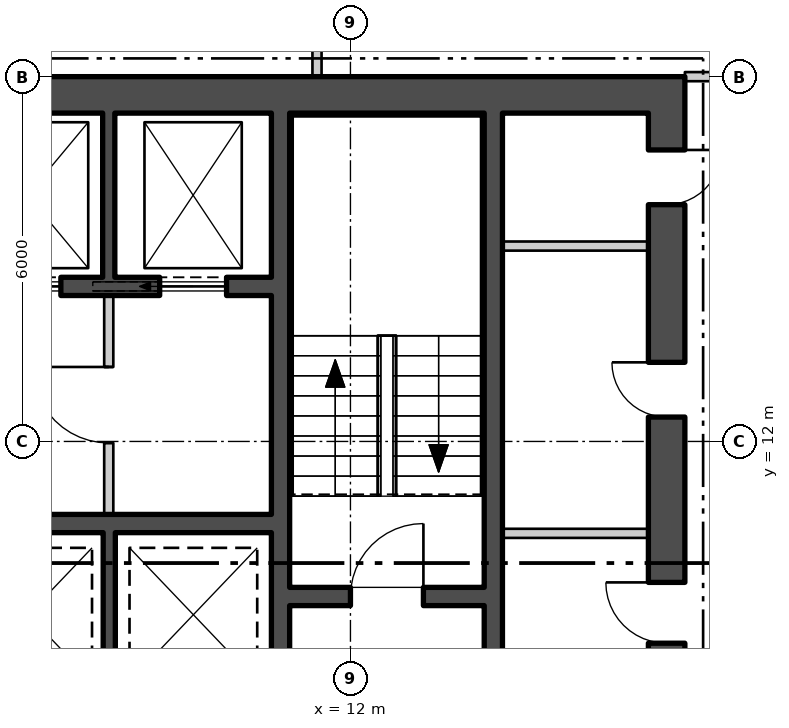
"""IFC4 building model, lengths in metres.
Left out: names, types, materials, properties, quantities, classifications, styles, units other than length and angle.
Written with IfcOpenShell. Run it as: python <this file> out.ifc"""

import sys

from ifc_helpers import new_model, si_unit, direction, frame, frame_2d, origin, place, context, subcontext, project, spatial, rectangle, extrude, element, fill, save


model = new_model("IFC4")
c1 = context("Model", 3, precision=1e-05, world=origin(), true_north=direction((0.0, 1.0)))
c2 = subcontext(c1, "Body", "Model", "MODEL_VIEW")
j1 = project(units=[si_unit("LENGTHUNIT", "METRE"), si_unit("PLANEANGLEUNIT", "RADIAN")], contexts=[c1])
p1 = place(None, origin())
s1 = spatial("IfcSite", under=j1, at=p1, CompositionType="ELEMENT")
p2 = place(p1, origin())
s2 = spatial("IfcBuilding", under=s1, at=p2, CompositionType="ELEMENT")
p3 = place(p2, frame((0.0, 0.0, 18.6)))
s3 = spatial("IfcBuildingStorey", under=s2, at=p3, CompositionType="ELEMENT", Elevation=18.6)
p4 = place(p3, frame((-17.5, 17.7, 0.0), z_axis=(0.0, 0.0, 1.0), x_axis=(1.0, 0.0, 0.0)))
e1 = element("IfcWall", 1, at=p4, inside=s3, PredefinedType="SHEAR", context=c2, shape_type="SweptSolid", body=[
    extrude(rectangle(XDim=35.0, YDim=0.6, at=frame_2d((17.5, 0.0))), origin(), (0.0, 0.0, 1.0), 4.88),
])
p5 = place(p3, frame((17.2, 0.6, 0.0), z_axis=(0.0, 0.0, 1.0), x_axis=(0.0, 1.0, 0.0)))
e2 = element("IfcWall", 2, at=p5, inside=s3, PredefinedType="SHEAR", context=c2, shape_type="SweptSolid", body=[
    extrude(rectangle(XDim=16.8, YDim=0.6, at=frame_2d((8.4, 0.0))), origin(), (0.0, 0.0, 1.0), 4.88),
])
p6 = place(p5, frame((5.7, 0.0, 0.0)))
e3 = element("IfcOpeningElement", 3, at=p6, cuts=e2, PredefinedType="OPENING", context=c2, shape_type="SweptSolid", body=[
    extrude(rectangle(XDim=1.5, YDim=2.1, at=frame_2d((0.75, 1.05))), frame((0.0, 0.31, 0.0), z_axis=(0.0, -1.0, 0.0), x_axis=(1.0, 0.0, 0.0)), (0.0, 0.0, 1.0), 0.62),
])
p7 = place(p5, frame((0.4, 0.0, 0.0)))
e4 = element("IfcOpeningElement", 4, at=p7, cuts=e2, PredefinedType="OPENING", context=c2, shape_type="SweptSolid", body=[
    extrude(rectangle(XDim=0.9, YDim=2.1, at=frame_2d((0.45, 1.05))), frame((0.0, 0.31, 0.0), z_axis=(0.0, -1.0, 0.0), x_axis=(1.0, 0.0, 0.0)), (0.0, 0.0, 1.0), 0.62),
])
p8 = place(p5, frame((3.15, 0.0, 0.0)))
e5 = element("IfcOpeningElement", 5, at=p8, cuts=e2, PredefinedType="OPENING", context=c2, shape_type="SweptSolid", body=[
    extrude(rectangle(XDim=0.9, YDim=2.1, at=frame_2d((0.45, 1.05))), frame((0.0, 0.31, 0.0), z_axis=(0.0, -1.0, 0.0), x_axis=(1.0, 0.0, 0.0)), (0.0, 0.0, 1.0), 0.62),
])
p9 = place(p5, frame((8.082, 0.0, 0.0)))
e6 = element("IfcOpeningElement", 6, at=p9, cuts=e2, PredefinedType="OPENING", context=c2, shape_type="SweptSolid", body=[
    extrude(rectangle(XDim=1.0, YDim=2.1, at=frame_2d((0.5, 1.05))), frame((0.0, 0.31, 0.0), z_axis=(0.0, -1.0, 0.0), x_axis=(1.0, 0.0, 0.0)), (0.0, 0.0, 1.0), 0.62),
])
p10 = place(p5, frame((11.801, 0.0, 0.0)))
e7 = element("IfcOpeningElement", 7, at=p10, cuts=e2, PredefinedType="OPENING", context=c2, shape_type="SweptSolid", body=[
    extrude(rectangle(XDim=0.9, YDim=2.1, at=frame_2d((0.45, 1.05))), frame((0.0, 0.31, 0.0), z_axis=(0.0, -1.0, 0.0), x_axis=(1.0, 0.0, 0.0)), (0.0, 0.0, 1.0), 0.62),
])
p11 = place(p5, frame((15.294, 0.0, 0.0)))
e8 = element("IfcOpeningElement", 8, at=p11, cuts=e2, PredefinedType="OPENING", context=c2, shape_type="SweptSolid", body=[
    extrude(rectangle(XDim=0.9, YDim=2.1, at=frame_2d((0.45, 1.05))), frame((0.0, 0.31, 0.0), z_axis=(0.0, -1.0, 0.0), x_axis=(1.0, 0.0, 0.0)), (0.0, 0.0, 1.0), 0.62),
])
p12 = place(p3, frame((10.85, 0.6, 0.0), z_axis=(0.0, 0.0, 1.0), x_axis=(0.0, 1.0, 0.0)))
e9 = element("IfcWall", 9, at=p12, inside=s3, PredefinedType="SHEAR", context=c2, shape_type="SweptSolid", body=[
    extrude(rectangle(XDim=16.8, YDim=0.3, at=frame_2d((8.4, 0.0))), origin(), (0.0, 0.0, 1.0), 4.88),
])
p13 = place(p12, frame((5.075, 0.0, 0.0)))
e10 = element("IfcOpeningElement", 10, at=p13, cuts=e9, PredefinedType="OPENING", context=c2, shape_type="SweptSolid", body=[
    extrude(rectangle(XDim=1.25, YDim=2.1, at=frame_2d((0.625, 1.05))), frame((0.0, 0.16, 0.0), z_axis=(0.0, -1.0, 0.0), x_axis=(1.0, 0.0, 0.0)), (0.0, 0.0, 1.0), 0.32),
])
p14 = place(p12, frame((1.525, 0.0, 0.0)))
e11 = element("IfcOpeningElement", 11, at=p14, cuts=e9, PredefinedType="OPENING", context=c2, shape_type="SweptSolid", body=[
    extrude(rectangle(XDim=1.0, YDim=2.1, at=frame_2d((0.5, 1.05))), frame((0.0, 0.16, 0.0), z_axis=(0.0, -1.0, 0.0), x_axis=(1.0, 0.0, 0.0)), (0.0, 0.0, 1.0), 0.32),
])
p15 = place(p3, frame((14.35, 0.6, 0.0), z_axis=(0.0, 0.0, 1.0), x_axis=(0.0, 1.0, 0.0)))
e12 = element("IfcWall", 12, at=p15, inside=s3, PredefinedType="SHEAR", context=c2, shape_type="SweptSolid", body=[
    extrude(rectangle(XDim=16.8, YDim=0.3, at=frame_2d((8.4, 0.0))), origin(), (0.0, 0.0, 1.0), 4.88),
])
p16 = place(p15, frame((5.7, 0.0, 0.0)))
e13 = element("IfcOpeningElement", 13, at=p16, cuts=e12, PredefinedType="OPENING", context=c2, shape_type="SweptSolid", body=[
    extrude(rectangle(XDim=1.5, YDim=2.1, at=frame_2d((0.75, 1.05))), frame((0.0, 0.16, 0.0), z_axis=(0.0, -1.0, 0.0), x_axis=(1.0, 0.0, 0.0)), (0.0, 0.0, 1.0), 0.32),
])
p17 = place(p3, frame((11.0, 9.45, 0.0), z_axis=(0.0, 0.0, 1.0), x_axis=(1.0, 0.0, 0.0)))
e14 = element("IfcWall", 14, at=p17, inside=s3, PredefinedType="SHEAR", context=c2, shape_type="SweptSolid", body=[
    extrude(rectangle(XDim=3.2, YDim=0.3, at=frame_2d((1.6, 0.0))), origin(), (0.0, 0.0, 1.0), 4.88),
])
p18 = place(p17, frame((1.0, 0.0, 0.0)))
e15 = element("IfcOpeningElement", 15, at=p18, cuts=e14, PredefinedType="OPENING", context=c2, shape_type="SweptSolid", body=[
    extrude(rectangle(XDim=1.2, YDim=2.1, at=frame_2d((0.6, 1.05))), frame((0.0, 0.16, 0.0), z_axis=(0.0, -1.0, 0.0), x_axis=(1.0, 0.0, 0.0)), (0.0, 0.0, 1.0), 0.32),
])
p19 = place(p3, frame((-10.7, 14.55, 0.0), z_axis=(0.0, 0.0, 1.0), x_axis=(1.0, 0.0, 0.0)))
e16 = element("IfcWall", 16, at=p19, inside=s3, PredefinedType="SHEAR", context=c2, shape_type="SweptSolid", body=[
    extrude(rectangle(XDim=21.4, YDim=0.3, at=frame_2d((10.7, 0.0))), origin(), (0.0, 0.0, 1.0), 4.88),
])
p20 = place(p19, frame((0.738, 0.0, 0.0)))
e17 = element("IfcOpeningElement", 17, at=p20, cuts=e16, PredefinedType="OPENING", context=c2, shape_type="SweptSolid", body=[
    extrude(rectangle(XDim=1.1, YDim=2.1, at=frame_2d((0.55, 1.05))), frame((0.0, 0.16, 0.0), z_axis=(0.0, -1.0, 0.0), x_axis=(1.0, 0.0, 0.0)), (0.0, 0.0, 1.0), 0.32),
])
p21 = place(p19, frame((3.462, 0.0, 0.0)))
e18 = element("IfcOpeningElement", 18, at=p21, cuts=e16, PredefinedType="OPENING", context=c2, shape_type="SweptSolid", body=[
    extrude(rectangle(XDim=1.1, YDim=2.1, at=frame_2d((0.55, 1.05))), frame((0.0, 0.16, 0.0), z_axis=(0.0, -1.0, 0.0), x_axis=(1.0, 0.0, 0.0)), (0.0, 0.0, 1.0), 0.32),
])
p22 = place(p19, frame((6.138, 0.0, 0.0)))
e19 = element("IfcOpeningElement", 19, at=p22, cuts=e16, PredefinedType="OPENING", context=c2, shape_type="SweptSolid", body=[
    extrude(rectangle(XDim=1.1, YDim=2.1, at=frame_2d((0.55, 1.05))), frame((0.0, 0.16, 0.0), z_axis=(0.0, -1.0, 0.0), x_axis=(1.0, 0.0, 0.0)), (0.0, 0.0, 1.0), 0.32),
])
p23 = place(p19, frame((8.812, 0.0, 0.0)))
e20 = element("IfcOpeningElement", 20, at=p23, cuts=e16, PredefinedType="OPENING", context=c2, shape_type="SweptSolid", body=[
    extrude(rectangle(XDim=1.1, YDim=2.1, at=frame_2d((0.55, 1.05))), frame((0.0, 0.16, 0.0), z_axis=(0.0, -1.0, 0.0), x_axis=(1.0, 0.0, 0.0)), (0.0, 0.0, 1.0), 0.32),
])
p24 = place(p19, frame((14.162, 0.0, 0.0)))
e21 = element("IfcOpeningElement", 21, at=p24, cuts=e16, PredefinedType="OPENING", context=c2, shape_type="SweptSolid", body=[
    extrude(rectangle(XDim=1.1, YDim=2.1, at=frame_2d((0.55, 1.05))), frame((0.0, 0.16, 0.0), z_axis=(0.0, -1.0, 0.0), x_axis=(1.0, 0.0, 0.0)), (0.0, 0.0, 1.0), 0.32),
])
p25 = place(p19, frame((16.837, 0.0, 0.0)))
e22 = element("IfcOpeningElement", 22, at=p25, cuts=e16, PredefinedType="OPENING", context=c2, shape_type="SweptSolid", body=[
    extrude(rectangle(XDim=1.1, YDim=2.1, at=frame_2d((0.55, 1.05))), frame((0.0, 0.16, 0.0), z_axis=(0.0, -1.0, 0.0), x_axis=(1.0, 0.0, 0.0)), (0.0, 0.0, 1.0), 0.32),
])
p26 = place(p19, frame((19.562, 0.0, 0.0)))
e23 = element("IfcOpeningElement", 23, at=p26, cuts=e16, PredefinedType="OPENING", context=c2, shape_type="SweptSolid", body=[
    extrude(rectangle(XDim=1.1, YDim=2.1, at=frame_2d((0.55, 1.05))), frame((0.0, 0.16, 0.0), z_axis=(0.0, -1.0, 0.0), x_axis=(1.0, 0.0, 0.0)), (0.0, 0.0, 1.0), 0.32),
])
p27 = place(p3, frame((2.6, 10.65, 0.0), z_axis=(0.0, 0.0, 1.0), x_axis=(1.0, 0.0, 0.0)))
e24 = element("IfcWall", 24, at=p27, inside=s3, PredefinedType="SHEAR", context=c2, shape_type="SweptSolid", body=[
    extrude(rectangle(XDim=8.1, YDim=0.3, at=frame_2d((4.05, 0.0))), origin(), (0.0, 0.0, 1.0), 4.88),
])
for number, where, z_axis, x_axis in (
    (25, (8.025, 14.7, 0.0), (0.0, 0.0, 1.0), (0.0, 1.0, 0.0)),
    (26, (8.033, 7.8, 0.0), (0.0, 0.0, 1.0), (0.0, 1.0, 0.0)),
):
    element("IfcWall", number, at=place(p3, frame(where, z_axis=z_axis, x_axis=x_axis)), inside=s3, PredefinedType="SHEAR", context=c2, shape_type="SweptSolid", body=[
        extrude(rectangle(XDim=2.7, YDim=0.2, at=frame_2d((1.35, 0.0))), origin(), (0.0, 0.0, 1.0), 4.88),
    ])
p28 = place(p3, frame((8.025, 10.8, 0.0), z_axis=(0.0, 0.0, 1.0), x_axis=(0.0, 1.0, 0.0)))
e27 = element("IfcWall", 27, at=p28, inside=s3, PredefinedType="PARTITIONING", context=c2, shape_type="SweptSolid", body=[
    extrude(rectangle(XDim=3.6, YDim=0.15, at=frame_2d((1.8, 0.0))), origin(), (0.0, 0.0, 1.0), 4.88),
])
p29 = place(p28, frame((1.175, 0.0, 0.0)))
e28 = element("IfcOpeningElement", 28, at=p29, cuts=e27, PredefinedType="OPENING", context=c2, shape_type="SweptSolid", body=[
    extrude(rectangle(XDim=1.25, YDim=2.1, at=frame_2d((0.625, 1.05))), frame((0.0, 0.085, 0.0), z_axis=(0.0, -1.0, 0.0), x_axis=(1.0, 0.0, 0.0)), (0.0, 0.0, 1.0), 0.17),
])
for number, where, z_axis, x_axis in (
    (29, (14.5, 10.489, 0.0), (0.0, 0.0, 1.0), (1.0, 0.0, 0.0)),
    (30, (14.5, 15.213, 0.0), (0.0, 0.0, 1.0), (1.0, 0.0, 0.0)),
):
    element("IfcWall", number, at=place(p3, frame(where, z_axis=z_axis, x_axis=x_axis)), inside=s3, PredefinedType="PARTITIONING", context=c2, shape_type="SweptSolid", body=[
        extrude(rectangle(XDim=2.4, YDim=0.15, at=frame_2d((1.2, 0.0))), origin(), (0.0, 0.0, 1.0), 4.88),
    ])
p30 = place(p3, frame((11.45, 18.0, 0.0), z_axis=(0.0, 0.0, 1.0), x_axis=(0.0, 1.0, 0.0)))
e31 = element("IfcWall", 31, at=p30, inside=s3, PredefinedType="PARTITIONING", context=c2, shape_type="SweptSolid", body=[
    extrude(rectangle(XDim=1.75, YDim=0.15, at=frame_2d((0.875, 0.0))), origin(), (0.0, 0.0, 1.0), 4.88),
])
p31 = place(p3, frame((17.5, 18.0, 0.0), z_axis=(0.0, 0.0, 1.0), x_axis=(1.0, 0.0, 0.0)))
e32 = element("IfcWall", 32, at=p31, inside=s3, PredefinedType="PARTITIONING", context=c2, shape_type="SweptSolid", body=[
    extrude(rectangle(XDim=2.475, YDim=0.15, at=frame_2d((1.238, 0.0))), origin(), (0.0, 0.0, 1.0), 4.33),
])
p32 = place(p25, origin())
e33 = element("IfcDoor", 33, at=p32, inside=s3, OperationType="SLIDING_TO_LEFT", PredefinedType="DOOR", context=c2, shape_type="SweptSolid", body=[
    extrude(rectangle(XDim=1.1, YDim=2.1, at=frame_2d((0.55, 1.05))), frame((0.0, 0.025, 0.0), z_axis=(0.0, -1.0, 0.0), x_axis=(1.0, 0.0, 0.0)), (0.0, 0.0, 1.0), 0.05),
])
fill(e22, e33)
p33 = place(p26, origin())
e34 = element("IfcDoor", 34, at=p33, inside=s3, OperationType="SLIDING_TO_LEFT", PredefinedType="DOOR", context=c2, shape_type="SweptSolid", body=[
    extrude(rectangle(XDim=1.1, YDim=2.1, at=frame_2d((0.55, 1.05))), frame((0.0, 0.025, 0.0), z_axis=(0.0, -1.0, 0.0), x_axis=(1.0, 0.0, 0.0)), (0.0, 0.0, 1.0), 0.05),
])
fill(e23, e34)
p34 = place(p29, origin())
e35 = element("IfcDoor", 35, at=p34, inside=s3, OperationType="SINGLE_SWING_LEFT", PredefinedType="DOOR", context=c2, shape_type="SweptSolid", body=[
    extrude(rectangle(XDim=1.25, YDim=2.1, at=frame_2d((0.625, 1.05))), frame((0.0, 0.025, 0.0), z_axis=(0.0, -1.0, 0.0), x_axis=(1.0, 0.0, 0.0)), (0.0, 0.0, 1.0), 0.05),
])
fill(e28, e35)
p35 = place(p18, origin())
e36 = element("IfcDoor", 36, at=p35, inside=s3, OperationType="SINGLE_SWING_LEFT", PredefinedType="DOOR", context=c2, shape_type="SweptSolid", body=[
    extrude(rectangle(XDim=1.2, YDim=2.1, at=frame_2d((0.6, 1.05))), frame((0.0, 0.025, 0.0), z_axis=(0.0, -1.0, 0.0), x_axis=(1.0, 0.0, 0.0)), (0.0, 0.0, 1.0), 0.05),
])
fill(e15, e36)
p36 = place(p9, origin())
e37 = element("IfcDoor", 37, at=p36, inside=s3, OperationType="SINGLE_SWING_LEFT", PredefinedType="DOOR", context=c2, shape_type="SweptSolid", body=[
    extrude(rectangle(XDim=1.0, YDim=2.1, at=frame_2d((0.5, 1.05))), frame((0.0, 0.025, 0.0), z_axis=(0.0, -1.0, 0.0), x_axis=(1.0, 0.0, 0.0)), (0.0, 0.0, 1.0), 0.05),
])
fill(e6, e37)
p37 = place(p10, origin())
e38 = element("IfcDoor", 38, at=p37, inside=s3, OperationType="SINGLE_SWING_LEFT", PredefinedType="DOOR", context=c2, shape_type="SweptSolid", body=[
    extrude(rectangle(XDim=0.9, YDim=2.1, at=frame_2d((0.45, 1.05))), frame((0.0, 0.025, 0.0), z_axis=(0.0, -1.0, 0.0), x_axis=(1.0, 0.0, 0.0)), (0.0, 0.0, 1.0), 0.05),
])
fill(e7, e38)
p38 = place(p11, origin())
e39 = element("IfcDoor", 39, at=p38, inside=s3, OperationType="SINGLE_SWING_RIGHT", PredefinedType="DOOR", context=c2, shape_type="SweptSolid", body=[
    extrude(rectangle(XDim=0.9, YDim=2.1, at=frame_2d((0.45, 1.05))), frame((0.0, 0.025, 0.0), z_axis=(0.0, -1.0, 0.0), x_axis=(1.0, 0.0, 0.0)), (0.0, 0.0, 1.0), 0.05),
])
fill(e8, e39)
save(model, sys.argv[1])
